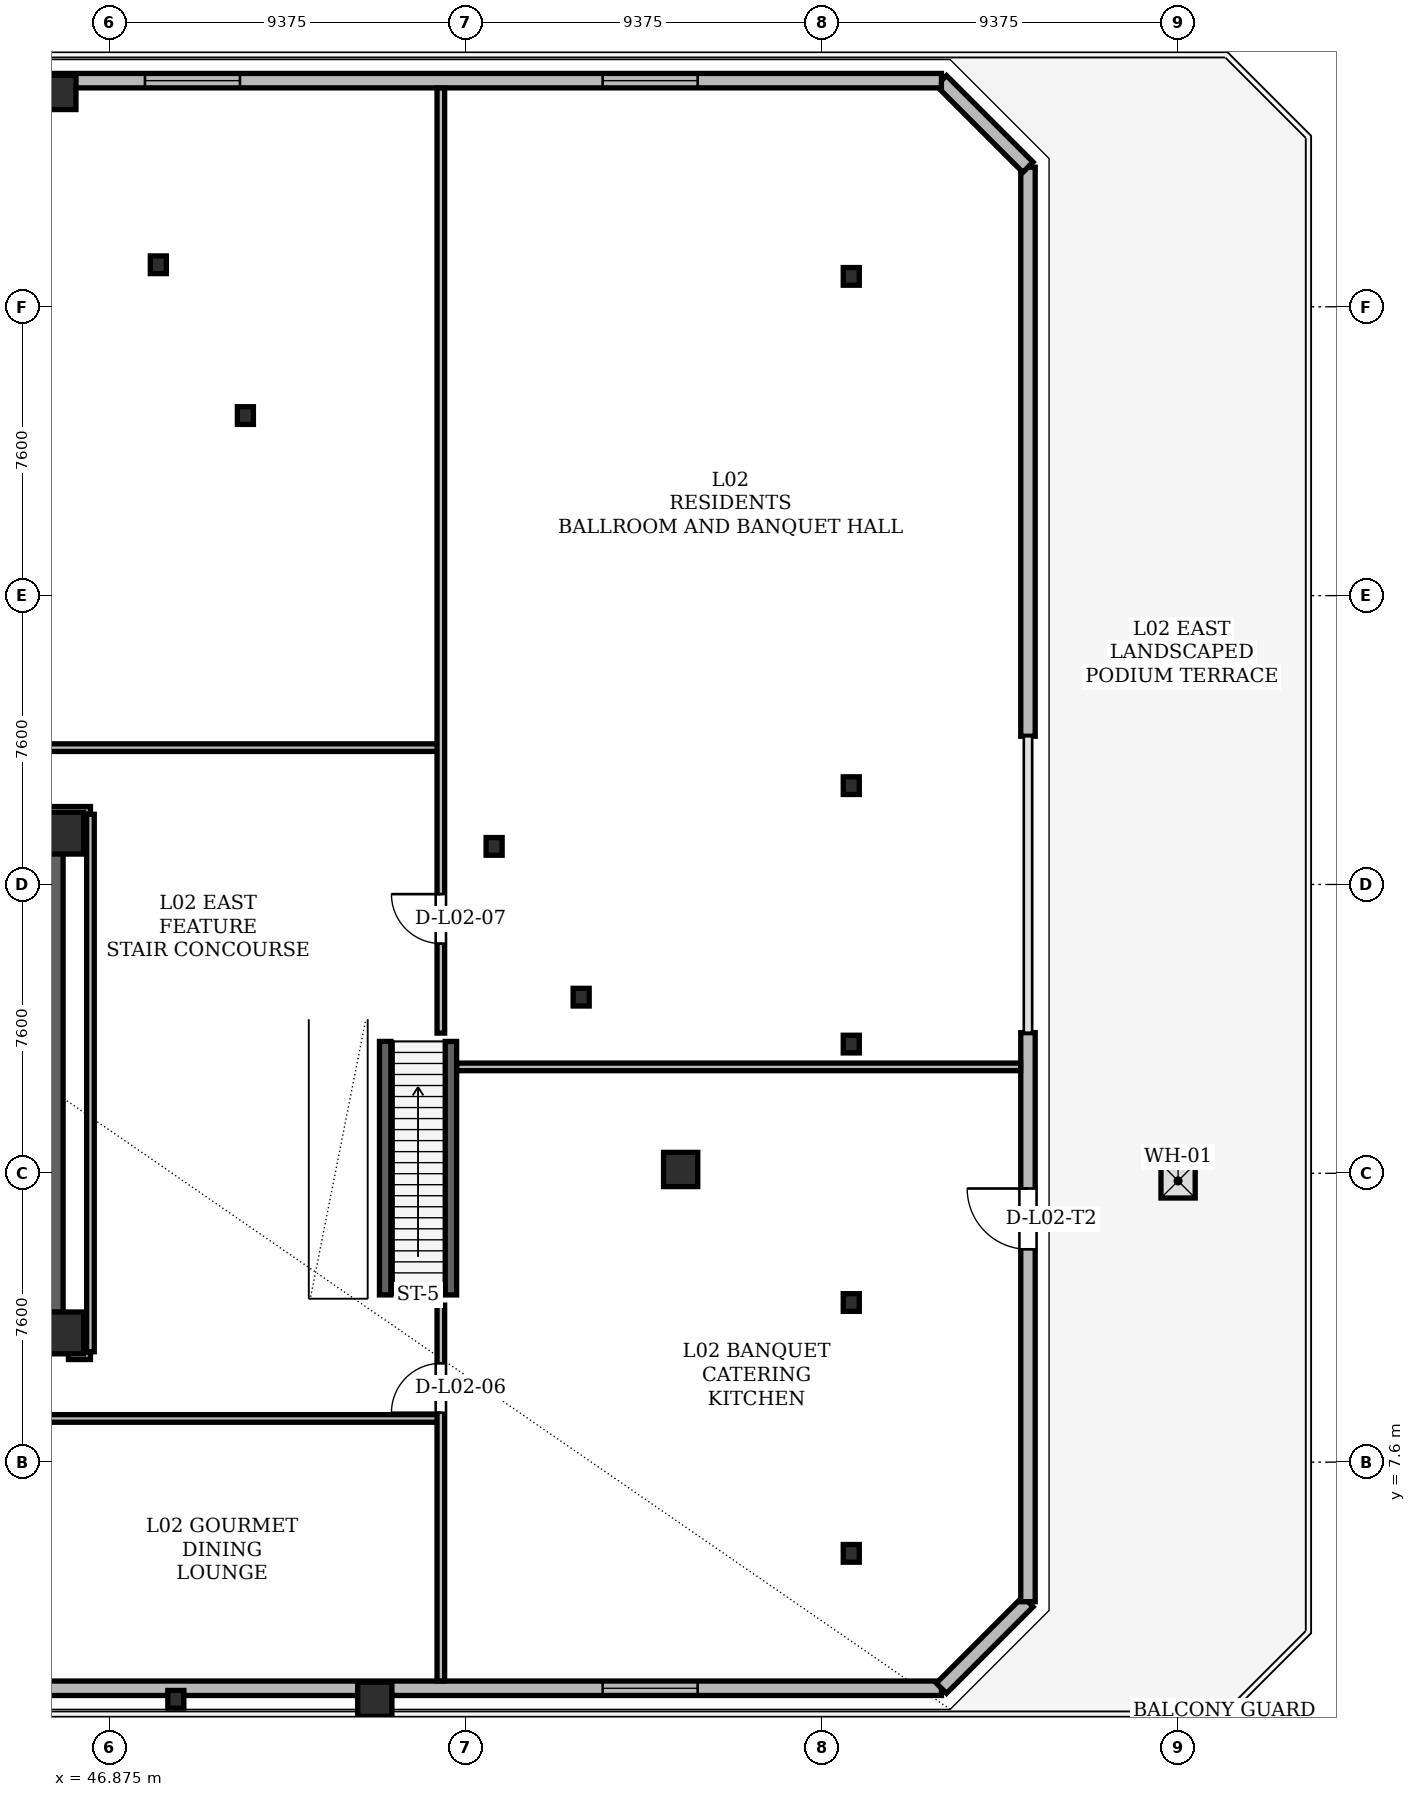
"""IFC4 building model, lengths in metres.
Left out: names, types, materials, properties, quantities, classifications, styles, units other than length and angle.
Written with IfcOpenShell. Run it as: python <this file> out.ifc"""

import sys

from ifc_helpers import new_model, si_unit, direction, frame, frame_2d, origin, origin_2d, place, context, subcontext, project, spatial, rectangle, hollow_rectangle, i_section, extrude, element, fill, save


model = new_model("IFC4")
c1 = context("Model", 3, precision=1e-05, world=origin(), true_north=direction((0.0, 1.0)))
c2 = subcontext(c1, "Body", "Model", "MODEL_VIEW")
j1 = project(units=[si_unit("LENGTHUNIT", "METRE"), si_unit("PLANEANGLEUNIT", "RADIAN")], contexts=[c1])
p1 = place(None, origin())
s1 = spatial("IfcSite", under=j1, at=p1, CompositionType="ELEMENT")
p2 = place(p1, origin())
s2 = spatial("IfcBuilding", under=s1, at=p2, CompositionType="ELEMENT")
p3 = place(p2, frame((0.0, 0.0, 9.9)))
s3 = spatial("IfcBuildingStorey", under=s2, at=p3, CompositionType="ELEMENT", Elevation=9.9)
for number, where, z_axis, x_axis in (
    (1, (45.65, 11.0, 0.0), (0.0, 0.0, 1.0), (1.0, 0.0, 0.0)),
    (2, (45.65, 24.15, 0.0), (0.0, 0.0, 1.0), (1.0, 0.0, 0.0)),
):
    element("IfcColumn", number, at=place(p3, frame(where, z_axis=z_axis, x_axis=x_axis)), inside=s3, PredefinedType="COLUMN", context=c2, shape_type="SweptSolid", body=[
        extrude(hollow_rectangle(XDim=1.1, YDim=1.1, WallThickness=0.09, at=origin_2d()), origin(), (0.0, 0.0, 1.0), 4.2),
    ])
for number, where, z_axis, x_axis in (
    (3, (53.862, 1.36, 0.005), (0.0, 0.0, 1.0), (1.0, 0.0, 0.0)),
    (4, (61.91, 15.3, 0.005), (0.0, 0.0, 1.0), (1.0, 0.0, 0.0)),
    (5, (45.548, 43.64, 0.005), (0.0, 0.0, 1.0), (1.0, 0.0, 0.0)),
):
    element("IfcColumn", number, at=place(p3, frame(where, z_axis=z_axis, x_axis=x_axis)), inside=s3, PredefinedType="COLUMN", context=c2, shape_type="SweptSolid", body=[
        extrude(hollow_rectangle(XDim=0.9, YDim=0.9, WallThickness=0.075, at=origin_2d()), origin(), (0.0, 0.0, 1.0), 4.191),
    ])
for number, where, z_axis, x_axis in (
    (6, (48.626, 1.36, 0.005), (0.0, 0.0, 1.0), (1.0, 0.0, 0.0)),
    (7, (59.292, 19.834, 0.005), (0.0, 0.0, 1.0), (1.0, 0.0, 0.0)),
    (8, (57.002, 23.802, 0.005), (0.0, 0.0, 1.0), (1.0, 0.0, 0.0)),
    (9, (50.457, 35.138, 0.005), (0.0, 0.0, 1.0), (1.0, 0.0, 0.0)),
    (10, (48.166, 39.106, 0.005), (0.0, 0.0, 1.0), (1.0, 0.0, 0.0)),
):
    element("IfcColumn", number, at=place(p3, frame(where, z_axis=z_axis, x_axis=x_axis)), inside=s3, PredefinedType="COLUMN", context=c2, shape_type="SweptSolid", body=[
        extrude(i_section(OverallWidth=0.422, OverallDepth=0.465, WebThickness=0.045, FlangeThickness=0.072, at=origin_2d()), origin(), (0.0, 0.0, 1.0), 4.191),
    ])
for number, where, z_axis, x_axis in (
    (11, (66.4, 5.2, 0.0), (0.0, 0.0, 1.0), (1.0, 0.0, 0.0)),
    (12, (66.4, 11.8, 0.0), (0.0, 0.0, 1.0), (1.0, 0.0, 0.0)),
    (13, (66.4, 18.6, 0.0), (0.0, 0.0, 1.0), (1.0, 0.0, 0.0)),
    (14, (66.4, 25.4, 0.0), (0.0, 0.0, 1.0), (1.0, 0.0, 0.0)),
    (15, (66.4, 32.2, 0.0), (0.0, 0.0, 1.0), (1.0, 0.0, 0.0)),
    (16, (66.4, 38.8, 0.0), (0.0, 0.0, 1.0), (1.0, 0.0, 0.0)),
):
    element("IfcColumn", number, at=place(p3, frame(where, z_axis=z_axis, x_axis=x_axis)), inside=s3, PredefinedType="COLUMN", context=c2, shape_type="SweptSolid", body=[
        extrude(i_section(OverallWidth=0.422, OverallDepth=0.465, WebThickness=0.045, FlangeThickness=0.072, at=origin_2d()), origin(), (0.0, 0.0, 1.0), 4.2),
    ])
p4 = place(p3, frame((45.36, 11.0, 0.0), z_axis=(0.0, 0.0, 1.0), x_axis=(0.0, 1.0, 0.0)))
e17 = element("IfcWall", 17, at=p4, inside=s3, PredefinedType="SHEAR", context=c2, shape_type="SweptSolid", body=[
    extrude(rectangle(XDim=13.3, YDim=0.6, at=frame_2d((6.65, 0.0))), origin(), (0.0, 0.0, 1.0), 3.92),
])
p5 = place(p3, frame((38.55, 11.24, 0.0), z_axis=(0.0, 0.0, 1.0), x_axis=(1.0, 0.0, 0.0)))
e18 = element("IfcWall", 18, at=p5, inside=s3, PredefinedType="SHEAR", context=c2, shape_type="SweptSolid", body=[
    extrude(rectangle(XDim=7.1, YDim=0.6, at=frame_2d((3.55, 0.0))), origin(), (0.0, 0.0, 1.0), 3.92),
])
for number, where, z_axis, x_axis in (
    (19, (54.135, 12.0, 0.0), (0.0, 0.0, 1.0), (0.0, 1.0, 0.0)),
    (20, (55.865, 12.0, 0.0), (0.0, 0.0, 1.0), (0.0, 1.0, 0.0)),
):
    element("IfcWall", number, at=place(p3, frame(where, z_axis=z_axis, x_axis=x_axis)), inside=s3, PredefinedType="SHEAR", context=c2, shape_type="SweptSolid", body=[
        extrude(rectangle(XDim=6.67, YDim=0.3, at=frame_2d((3.335, 0.0))), origin(), (0.0, 0.0, 1.0), 3.92),
    ])
p6 = place(p3, frame((41.4, 1.65, 0.0), z_axis=(0.0, 0.0, 1.0), x_axis=(1.0, 0.0, 0.0)))
e21 = element("IfcWall", 21, at=p6, inside=s3, PredefinedType="SOLIDWALL", context=c2, shape_type="SweptSolid", body=[
    extrude(rectangle(XDim=27.372, YDim=0.38, at=frame_2d((13.686, 0.0))), origin(), (0.0, 0.0, 1.0), 2.983),
])
p7 = place(p6, frame((18.458, 0.0, 0.85)))
e22 = element("IfcOpeningElement", 22, at=p7, cuts=e21, PredefinedType="OPENING", context=c2, shape_type="SweptSolid", body=[
    extrude(rectangle(XDim=2.5, YDim=1.963, at=frame_2d((1.25, 0.981))), frame((0.0, 0.19, 0.0), z_axis=(0.0, -1.0, 0.0), x_axis=(1.0, 0.0, 0.0)), (0.0, 0.0, 1.0), 0.38),
])
p8 = place(p3, frame((68.772, 1.65, 0.0), z_axis=(0.0, 0.0, 1.0), x_axis=(0.707106781187, 0.707106781187, 0.0)))
e23 = element("IfcWall", 23, at=p8, inside=s3, PredefinedType="SOLIDWALL", context=c2, shape_type="SweptSolid", body=[
    extrude(rectangle(XDim=3.221, YDim=0.38, at=frame_2d((1.611, 0.0))), origin(), (0.0, 0.0, 1.0), 3.92),
])
p9 = place(p3, frame((71.05, 3.928, 0.0), z_axis=(0.0, 0.0, 1.0), x_axis=(0.0, 1.0, 0.0)))
e24 = element("IfcWall", 24, at=p9, inside=s3, PredefinedType="SOLIDWALL", context=c2, shape_type="SweptSolid", body=[
    extrude(rectangle(XDim=14.972, YDim=0.38, at=frame_2d((7.486, 0.0))), origin(), (0.0, 0.0, 1.0), 3.92),
])
p10 = place(p9, frame((9.272, 0.0, 0.0)))
e25 = element("IfcOpeningElement", 25, at=p10, cuts=e24, PredefinedType="OPENING", context=c2, shape_type="SweptSolid", body=[
    extrude(rectangle(XDim=1.6, YDim=2.2, at=frame_2d((0.8, 1.1))), frame((0.0, 0.19, 0.0), z_axis=(0.0, -1.0, 0.0), x_axis=(1.0, 0.0, 0.0)), (0.0, 0.0, 1.0), 0.38),
])
p11 = place(p3, frame((71.05, 26.7, 0.0), z_axis=(0.0, 0.0, 1.0), x_axis=(0.0, 1.0, 0.0)))
e26 = element("IfcWall", 26, at=p11, inside=s3, PredefinedType="SOLIDWALL", context=c2, shape_type="SweptSolid", body=[
    extrude(rectangle(XDim=14.972, YDim=0.38, at=frame_2d((7.486, 0.0))), origin(), (0.0, 0.0, 1.0), 3.92),
])
p12 = place(p3, frame((71.05, 41.672, 0.0), z_axis=(0.0, 0.0, 1.0), x_axis=(-0.707106781187, 0.707106781187, 0.0)))
e27 = element("IfcWall", 27, at=p12, inside=s3, PredefinedType="SOLIDWALL", context=c2, shape_type="SweptSolid", body=[
    extrude(rectangle(XDim=3.221, YDim=0.38, at=frame_2d((1.611, 0.0))), origin(), (0.0, 0.0, 1.0), 3.92),
])
p13 = place(p3, frame((68.772, 43.95, 0.0), z_axis=(0.0, 0.0, 1.0), x_axis=(-1.0, 0.0, 0.0)))
e28 = element("IfcWall", 28, at=p13, inside=s3, PredefinedType="SOLIDWALL", context=c2, shape_type="SweptSolid", body=[
    extrude(rectangle(XDim=27.372, YDim=0.38, at=frame_2d((13.686, 0.0))), origin(), (0.0, 0.0, 1.0), 3.054),
])
p14 = place(p13, frame((6.414, 0.0, 0.85)))
e29 = element("IfcOpeningElement", 29, at=p14, cuts=e28, PredefinedType="OPENING", context=c2, shape_type="SweptSolid", body=[
    extrude(rectangle(XDim=2.5, YDim=2.034, at=frame_2d((1.25, 1.017))), frame((0.0, 0.19, 0.0), z_axis=(0.0, -1.0, 0.0), x_axis=(1.0, 0.0, 0.0)), (0.0, 0.0, 1.0), 0.38),
])
p15 = place(p13, frame((18.458, 0.0, 0.85)))
e30 = element("IfcOpeningElement", 30, at=p15, cuts=e28, PredefinedType="OPENING", context=c2, shape_type="SweptSolid", body=[
    extrude(rectangle(XDim=2.5, YDim=2.034, at=frame_2d((1.25, 1.017))), frame((0.0, 0.19, 0.0), z_axis=(0.0, -1.0, 0.0), x_axis=(1.0, 0.0, 0.0)), (0.0, 0.0, 1.0), 0.38),
])
p16 = place(p3, frame((14.03, 8.75, 0.0), z_axis=(0.0, 0.0, 1.0), x_axis=(1.0, 0.0, 0.0)))
e31 = element("IfcWall", 31, at=p16, inside=s3, PredefinedType="PARTITIONING", context=c2, shape_type="SweptSolid", body=[
    extrude(rectangle(XDim=41.57, YDim=0.2, at=frame_2d((20.785, 0.0))), origin(), (0.0, 0.0, 1.0), 2.983),
])
p17 = place(p16, frame((20.035, 0.0, 0.0)))
e32 = element("IfcOpeningElement", 32, at=p17, cuts=e31, PredefinedType="OPENING", context=c2, shape_type="SweptSolid", body=[
    extrude(rectangle(XDim=1.3, YDim=2.2, at=frame_2d((0.65, 1.1))), frame((0.0, 0.1, 0.0), z_axis=(0.0, -1.0, 0.0), x_axis=(1.0, 0.0, 0.0)), (0.0, 0.0, 1.0), 0.2),
])
p18 = place(p3, frame((45.8, 10.4, 0.0), z_axis=(0.0, 0.0, 1.0), x_axis=(1.0, 0.0, 0.0)))
e33 = element("IfcWall", 33, at=p18, inside=s3, PredefinedType="PARTITIONING", context=c2, shape_type="SweptSolid", body=[
    extrude(rectangle(XDim=0.58, YDim=0.2, at=frame_2d((0.29, 0.0))), origin(), (0.0, 0.0, 1.0), 2.983),
])
p19 = place(p3, frame((56.019, 18.0, 0.0), z_axis=(0.0, 0.0, 1.0), x_axis=(1.0, 0.0, 0.0)))
e34 = element("IfcWall", 34, at=p19, inside=s3, PredefinedType="PARTITIONING", context=c2, shape_type="SweptSolid", body=[
    extrude(rectangle(XDim=14.837, YDim=0.2, at=frame_2d((7.418, 0.0))), origin(), (0.0, 0.0, 1.0), 2.983),
])
p20 = place(p3, frame((28.62, 24.75, 0.0), z_axis=(0.0, 0.0, 1.0), x_axis=(1.0, 0.0, 0.0)))
e35 = element("IfcWall", 35, at=p20, inside=s3, PredefinedType="PARTITIONING", context=c2, shape_type="SweptSolid", body=[
    extrude(rectangle(XDim=17.76, YDim=0.2, at=frame_2d((8.88, 0.0))), origin(), (0.0, 0.0, 1.0), 2.983),
])
p21 = place(p3, frame((27.05, 26.4, 0.0), z_axis=(0.0, 0.0, 1.0), x_axis=(1.0, 0.0, 0.0)))
e36 = element("IfcWall", 36, at=p21, inside=s3, PredefinedType="PARTITIONING", context=c2, shape_type="SweptSolid", body=[
    extrude(rectangle(XDim=28.55, YDim=0.2, at=frame_2d((14.275, 0.0))), origin(), (0.0, 0.0, 1.0), 2.983),
])
p22 = place(p21, frame((2.885, 0.0, 0.0)))
e37 = element("IfcOpeningElement", 37, at=p22, cuts=e36, PredefinedType="OPENING", context=c2, shape_type="SweptSolid", body=[
    extrude(rectangle(XDim=0.88, YDim=2.08, at=frame_2d((0.44, 1.04))), frame((0.0, 0.1, 0.0), z_axis=(0.0, -1.0, 0.0), x_axis=(1.0, 0.0, 0.0)), (0.0, 0.0, 1.0), 0.2),
])
p23 = place(p21, frame((8.964, 0.0, 0.0)))
e38 = element("IfcOpeningElement", 38, at=p23, cuts=e36, PredefinedType="OPENING", context=c2, shape_type="SweptSolid", body=[
    extrude(rectangle(XDim=0.88, YDim=2.08, at=frame_2d((0.44, 1.04))), frame((0.0, 0.1, 0.0), z_axis=(0.0, -1.0, 0.0), x_axis=(1.0, 0.0, 0.0)), (0.0, 0.0, 1.0), 0.2),
])
p24 = place(p21, frame((14.688, 0.0, 0.0)))
e39 = element("IfcOpeningElement", 39, at=p24, cuts=e36, PredefinedType="OPENING", context=c2, shape_type="SweptSolid", body=[
    extrude(rectangle(XDim=0.88, YDim=2.08, at=frame_2d((0.44, 1.04))), frame((0.0, 0.1, 0.0), z_axis=(0.0, -1.0, 0.0), x_axis=(1.0, 0.0, 0.0)), (0.0, 0.0, 1.0), 0.2),
])
p25 = place(p3, frame((46.38, 10.504, 0.0), z_axis=(0.0, 0.0, 1.0), x_axis=(0.0, 1.0, 0.0)))
e40 = element("IfcWall", 40, at=p25, inside=s3, PredefinedType="PARTITIONING", context=c2, shape_type="SweptSolid", body=[
    extrude(rectangle(XDim=14.142, YDim=0.2, at=frame_2d((7.071, 0.0))), origin(), (0.0, 0.0, 1.0), 3.92),
])
p26 = place(p3, frame((55.6, 1.844, 0.0), z_axis=(0.0, 0.0, 1.0), x_axis=(0.0, 1.0, 0.0)))
e41 = element("IfcWall", 41, at=p26, inside=s3, PredefinedType="PARTITIONING", context=c2, shape_type="SweptSolid", body=[
    extrude(rectangle(XDim=9.886, YDim=0.2, at=frame_2d((4.943, 0.0))), origin(), (0.0, 0.0, 1.0), 3.054),
])
p27 = place(p26, frame((7.056, 0.0, 0.0)))
e42 = element("IfcOpeningElement", 42, at=p27, cuts=e41, PredefinedType="OPENING", context=c2, shape_type="SweptSolid", body=[
    extrude(rectangle(XDim=1.3, YDim=2.2, at=frame_2d((0.65, 1.1))), frame((0.0, 0.1, 0.0), z_axis=(0.0, -1.0, 0.0), x_axis=(1.0, 0.0, 0.0)), (0.0, 0.0, 1.0), 0.2),
])
p28 = place(p3, frame((55.6, 18.889, 0.0), z_axis=(0.0, 0.0, 1.0), x_axis=(0.0, 1.0, 0.0)))
e43 = element("IfcWall", 43, at=p28, inside=s3, PredefinedType="PARTITIONING", context=c2, shape_type="SweptSolid", body=[
    extrude(rectangle(XDim=24.867, YDim=0.2, at=frame_2d((12.433, 0.0))), origin(), (0.0, 0.0, 1.0), 2.71),
])
p29 = place(p28, frame((2.356, 0.0, 0.0)))
e44 = element("IfcOpeningElement", 44, at=p29, cuts=e43, PredefinedType="OPENING", context=c2, shape_type="SweptSolid", body=[
    extrude(rectangle(XDim=1.3, YDim=2.2, at=frame_2d((0.65, 1.1))), frame((0.0, 0.1, 0.0), z_axis=(0.0, -1.0, 0.0), x_axis=(1.0, 0.0, 0.0)), (0.0, 0.0, 1.0), 0.2),
])
p30 = place(p7, origin())
e45 = element("IfcWindow", 45, at=p30, inside=s3, PartitioningType="SINGLE_PANEL", PredefinedType="WINDOW", context=c2, shape_type="SweptSolid", body=[
    extrude(rectangle(XDim=2.5, YDim=1.963, at=frame_2d((1.25, 0.981))), frame((0.0, 0.03, 0.0), z_axis=(0.0, -1.0, 0.0), x_axis=(1.0, 0.0, 0.0)), (0.0, 0.0, 1.0), 0.06),
])
fill(e22, e45)
p31 = place(p10, origin())
e46 = element("IfcDoor", 46, at=p31, inside=s3, OperationType="SINGLE_SWING_RIGHT", PredefinedType="DOOR", context=c2, shape_type="SweptSolid", body=[
    extrude(rectangle(XDim=1.6, YDim=2.2, at=frame_2d((0.8, 1.1))), frame((0.0, 0.025, 0.0), z_axis=(0.0, -1.0, 0.0), x_axis=(1.0, 0.0, 0.0)), (0.0, 0.0, 1.0), 0.05),
])
fill(e25, e46)
p32 = place(p14, origin())
e47 = element("IfcWindow", 47, at=p32, inside=s3, PartitioningType="SINGLE_PANEL", PredefinedType="WINDOW", context=c2, shape_type="SweptSolid", body=[
    extrude(rectangle(XDim=2.5, YDim=2.034, at=frame_2d((1.25, 1.017))), frame((0.0, 0.03, 0.0), z_axis=(0.0, -1.0, 0.0), x_axis=(1.0, 0.0, 0.0)), (0.0, 0.0, 1.0), 0.06),
])
fill(e29, e47)
p33 = place(p15, origin())
e48 = element("IfcWindow", 48, at=p33, inside=s3, PartitioningType="SINGLE_PANEL", PredefinedType="WINDOW", context=c2, shape_type="SweptSolid", body=[
    extrude(rectangle(XDim=2.5, YDim=2.034, at=frame_2d((1.25, 1.017))), frame((0.0, 0.03, 0.0), z_axis=(0.0, -1.0, 0.0), x_axis=(1.0, 0.0, 0.0)), (0.0, 0.0, 1.0), 0.06),
])
fill(e30, e48)
p34 = place(p3, frame((0.0, 0.0, -0.28)))
p35 = place(p34, frame((75.0, 15.0, 0.0)))
p36 = place(p35, frame((0.0, 0.0, 0.23)))
e49 = element("IfcWindow", 49, at=p36, inside=s3, PartitioningType="SINGLE_PANEL", PredefinedType="SKYLIGHT", context=c2, shape_type="SweptSolid", body=[
    extrude(rectangle(XDim=0.9, YDim=0.9, at=origin_2d()), origin(), (0.0, 0.0, 1.0), 0.05),
])
p37 = place(p27, origin())
e50 = element("IfcDoor", 50, at=p37, inside=s3, OperationType="SINGLE_SWING_LEFT", PredefinedType="DOOR", context=c2, shape_type="SweptSolid", body=[
    extrude(rectangle(XDim=1.3, YDim=2.2, at=frame_2d((0.65, 1.1))), frame((0.0, 0.025, 0.0), z_axis=(0.0, -1.0, 0.0), x_axis=(1.0, 0.0, 0.0)), (0.0, 0.0, 1.0), 0.05),
])
fill(e42, e50)
p38 = place(p29, origin())
e51 = element("IfcDoor", 51, at=p38, inside=s3, OperationType="SINGLE_SWING_RIGHT", PredefinedType="DOOR", context=c2, shape_type="SweptSolid", body=[
    extrude(rectangle(XDim=1.3, YDim=2.2, at=frame_2d((0.65, 1.1))), frame((0.0, 0.025, 0.0), z_axis=(0.0, -1.0, 0.0), x_axis=(1.0, 0.0, 0.0)), (0.0, 0.0, 1.0), 0.05),
])
fill(e44, e51)
save(model, sys.argv[1])
